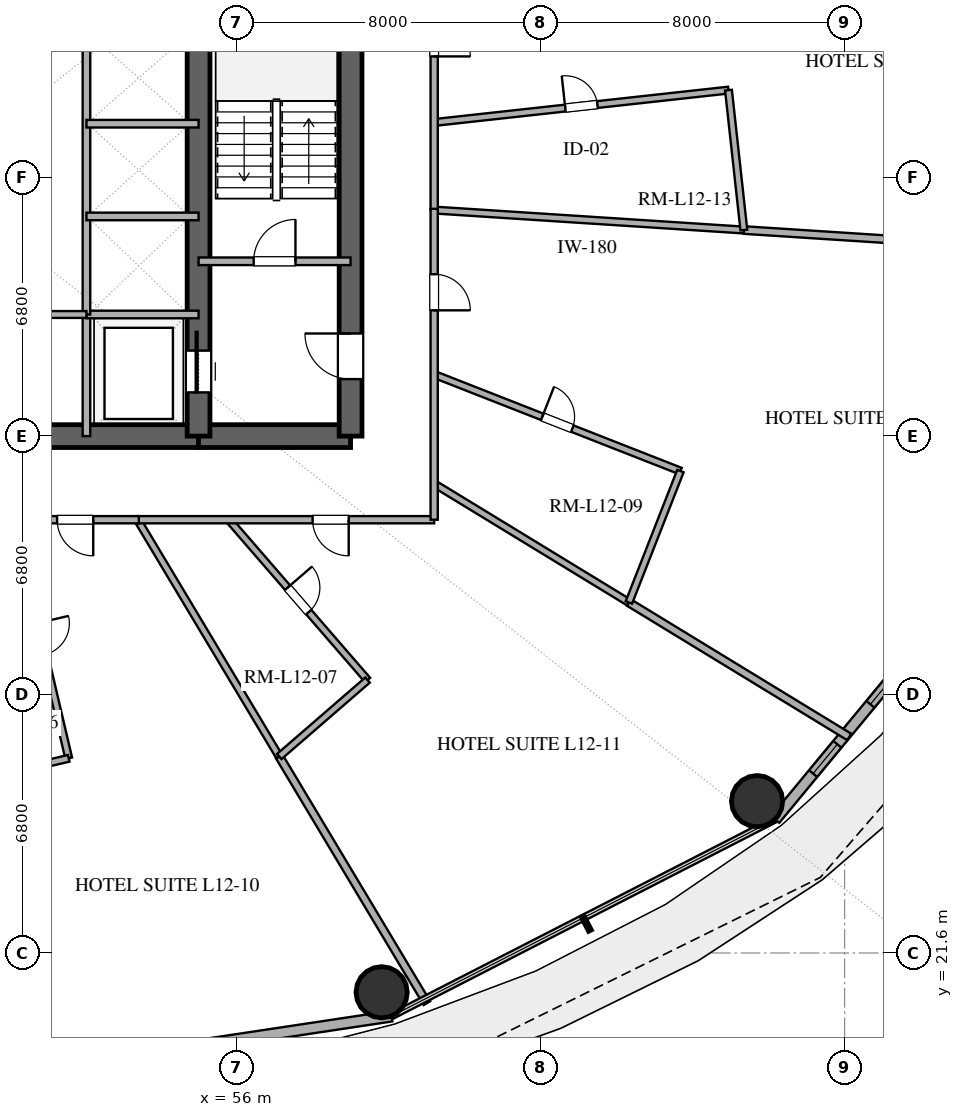
"""IFC4 building model, lengths in metres.
Left out: names, types, materials, properties, quantities, classifications, styles, units other than length and angle.
Written with IfcOpenShell. Run it as: python <this file> out.ifc"""

import sys

from ifc_helpers import new_model, si_unit, direction, frame, frame_2d, origin, origin_2d, place, context, subcontext, project, spatial, rectangle, hollow_circle, extrude, element, fill, save


model = new_model("IFC4")
c1 = context("Model", 3, precision=1e-05, world=origin(), true_north=direction((0.0, 1.0)))
c2 = subcontext(c1, "Body", "Model", "MODEL_VIEW")
j1 = project(units=[si_unit("LENGTHUNIT", "METRE"), si_unit("PLANEANGLEUNIT", "RADIAN")], contexts=[c1])
p1 = place(None, origin())
s1 = spatial("IfcSite", under=j1, at=p1, CompositionType="ELEMENT")
p2 = place(p1, origin())
s2 = spatial("IfcBuilding", under=s1, at=p2, CompositionType="ELEMENT")
p3 = place(p2, frame((0.0, 0.0, 53.4)))
s3 = spatial("IfcBuildingStorey", under=s2, at=p3, CompositionType="ELEMENT", Elevation=53.4)
p4 = place(p3, frame((41.0, 35.2, 0.0), z_axis=(0.0, 0.0, 1.0), x_axis=(1.0, 0.0, 0.0)))
e1 = element("IfcWall", 1, at=p4, inside=s3, PredefinedType="SHEAR", context=c2, shape_type="SweptSolid", body=[
    extrude(rectangle(XDim=14.0, YDim=0.6, at=frame_2d((7.0, 0.0))), origin(), (0.0, 0.0, 1.0), 3.38),
])
p5 = place(p4, frame((6.1, 0.0, 0.0)))
e2 = element("IfcOpeningElement", 2, at=p5, cuts=e1, PredefinedType="OPENING", context=c2, shape_type="SweptSolid", body=[
    extrude(rectangle(XDim=1.8, YDim=2.25, at=frame_2d((0.9, 1.125))), frame((0.0, 0.31, 0.0), z_axis=(0.0, -1.0, 0.0), x_axis=(1.0, 0.0, 0.0)), (0.0, 0.0, 1.0), 0.62),
])
p6 = place(p3, frame((55.0, 35.2, 0.0), z_axis=(0.0, 0.0, 1.0), x_axis=(1.0, 0.0, 0.0)))
e3 = element("IfcWall", 3, at=p6, inside=s3, PredefinedType="SHEAR", context=c2, shape_type="SweptSolid", body=[
    extrude(rectangle(XDim=4.0, YDim=0.6, at=frame_2d((2.0, 0.0))), origin(), (0.0, 0.0, 1.0), 3.38),
])
p7 = place(p3, frame((59.0, 35.2, 0.0), z_axis=(0.0, 0.0, 1.0), x_axis=(0.0, 1.0, 0.0)))
e4 = element("IfcWall", 4, at=p7, inside=s3, PredefinedType="SHEAR", context=c2, shape_type="SweptSolid", body=[
    extrude(rectangle(XDim=13.6, YDim=0.6, at=frame_2d((6.8, 0.0))), origin(), (0.0, 0.0, 1.0), 3.38),
])
p8 = place(p7, frame((1.5, 0.0, 0.0)))
e5 = element("IfcOpeningElement", 5, at=p8, cuts=e4, PredefinedType="OPENING", context=c2, shape_type="SweptSolid", body=[
    extrude(rectangle(XDim=1.2, YDim=2.15, at=frame_2d((0.6, 1.075))), frame((0.0, 0.31, 0.0), z_axis=(0.0, -1.0, 0.0), x_axis=(1.0, 0.0, 0.0)), (0.0, 0.0, 1.0), 0.62),
])
p9 = place(p3, frame((55.0, 35.2, 0.0), z_axis=(0.0, 0.0, 1.0), x_axis=(0.0, 1.0, 0.0)))
e6 = element("IfcWall", 6, at=p9, inside=s3, PredefinedType="SHEAR", context=c2, shape_type="SweptSolid", body=[
    extrude(rectangle(XDim=13.6, YDim=0.6, at=frame_2d((6.8, 0.0))), origin(), (0.0, 0.0, 1.0), 3.38),
])
p10 = place(p9, frame((1.15, 0.0, 0.0)))
e7 = element("IfcOpeningElement", 7, at=p10, cuts=e6, PredefinedType="OPENING", context=c2, shape_type="SweptSolid", body=[
    extrude(rectangle(XDim=1.1, YDim=2.2, at=frame_2d((0.55, 1.1))), frame((0.0, 0.31, 0.0), z_axis=(0.0, -1.0, 0.0), x_axis=(1.0, 0.0, 0.0)), (0.0, 0.0, 1.0), 0.62),
])
for number, where, z_axis, x_axis in (
    (8, (59.818, 20.566, 0.0), (0.0, 0.0, 1.0), (1.0, 0.0, 0.0)),
    (9, (69.697, 25.595, 0.0), (0.0, 0.0, 1.0), (1.0, 0.0, 0.0)),
):
    element("IfcColumn", number, at=place(p3, frame(where, z_axis=z_axis, x_axis=x_axis)), inside=s3, PredefinedType="COLUMN", context=c2, shape_type="SweptSolid", body=[
        extrude(hollow_circle(Radius=0.675, WallThickness=0.036, at=origin_2d()), origin(), (0.0, 0.0, 1.0), 3.38),
    ])
p11 = place(p3, frame((48.0, 18.12, 0.0), z_axis=(0.0, 0.0, 1.0), x_axis=(0.988864835849, 0.148816452121, 0.0)))
e10 = element("IfcWall", 10, at=p11, inside=s3, PredefinedType="SOLIDWALL", context=c2, shape_type="SweptSolid", body=[
    extrude(rectangle(XDim=12.214, YDim=0.28, at=frame_2d((6.107, 0.0))), origin(), (0.0, 0.0, 1.0), 3.38),
])
p12 = place(p11, frame((1.621, 0.0, 0.0)))
e11 = element("IfcOpeningElement", 11, at=p12, cuts=e10, PredefinedType="OPENING", context=c2, shape_type="SweptSolid", body=[
    extrude(rectangle(XDim=1.05, YDim=2.2, at=frame_2d((0.525, 1.1))), frame((0.0, 0.15, 0.0), z_axis=(0.0, -1.0, 0.0), x_axis=(1.0, 0.0, 0.0)), (0.0, 0.0, 1.0), 0.3),
])
p13 = place(p3, frame((70.174, 25.114, 0.0), z_axis=(0.0, 0.0, 1.0), x_axis=(0.637296809613, 0.770618437657, 0.0)))
e12 = element("IfcWall", 12, at=p13, inside=s3, PredefinedType="SOLIDWALL", context=c2, shape_type="SweptSolid", body=[
    extrude(rectangle(XDim=10.053, YDim=0.28, at=frame_2d((5.027, 0.0))), origin(), (0.0, 0.0, 1.0), 3.38),
])
p14 = place(p13, frame((1.565, 0.0, 0.85)))
e13 = element("IfcOpeningElement", 13, at=p14, cuts=e12, PredefinedType="OPENING", context=c2, shape_type="SweptSolid", body=[
    extrude(rectangle(XDim=1.0, YDim=1.8, at=frame_2d((0.5, 0.9))), frame((0.0, 0.15, 0.0), z_axis=(0.0, -1.0, 0.0), x_axis=(1.0, 0.0, 0.0)), (0.0, 0.0, 1.0), 0.3),
])
p15 = place(p13, frame((3.93, 0.0, 0.85)))
e14 = element("IfcOpeningElement", 14, at=p15, cuts=e12, PredefinedType="OPENING", context=c2, shape_type="SweptSolid", body=[
    extrude(rectangle(XDim=1.5, YDim=1.8, at=frame_2d((0.75, 0.9))), frame((0.0, 0.15, 0.0), z_axis=(0.0, -1.0, 0.0), x_axis=(1.0, 0.0, 0.0)), (0.0, 0.0, 1.0), 0.3),
])
p16 = place(p13, frame((6.196, 0.0, 0.85)))
e15 = element("IfcOpeningElement", 15, at=p16, cuts=e12, PredefinedType="OPENING", context=c2, shape_type="SweptSolid", body=[
    extrude(rectangle(XDim=1.5, YDim=1.8, at=frame_2d((0.75, 0.9))), frame((0.0, 0.15, 0.0), z_axis=(0.0, -1.0, 0.0), x_axis=(1.0, 0.0, 0.0)), (0.0, 0.0, 1.0), 0.3),
])
p17 = place(p3, frame((55.0, 39.8, 0.0), z_axis=(0.0, 0.0, 1.0), x_axis=(1.0, 0.0, 0.0)))
e16 = element("IfcWall", 16, at=p17, inside=s3, PredefinedType="SOLIDWALL", context=c2, shape_type="SweptSolid", body=[
    extrude(rectangle(XDim=4.0, YDim=0.2, at=frame_2d((2.0, 0.0))), origin(), (0.0, 0.0, 1.0), 2.74),
])
p18 = place(p17, frame((1.45, 0.0, 0.0)))
e17 = element("IfcOpeningElement", 17, at=p18, cuts=e16, PredefinedType="OPENING", context=c2, shape_type="SweptSolid", body=[
    extrude(rectangle(XDim=1.1, YDim=2.15, at=frame_2d((0.55, 1.075))), frame((0.0, 0.11, 0.0), z_axis=(0.0, -1.0, 0.0), x_axis=(1.0, 0.0, 0.0)), (0.0, 0.0, 1.0), 0.22),
])
p19 = place(p3, frame((52.05, 35.2, 0.0), z_axis=(0.0, 0.0, 1.0), x_axis=(0.0, 1.0, 0.0)))
e18 = element("IfcWall", 18, at=p19, inside=s3, PredefinedType="SOLIDWALL", context=c2, shape_type="SweptSolid", body=[
    extrude(rectangle(XDim=3.2, YDim=0.2, at=frame_2d((1.6, 0.0))), origin(), (0.0, 0.0, 1.0), 2.74),
])
p20 = place(p3, frame((52.05, 38.4, 0.0), z_axis=(0.0, 0.0, 1.0), x_axis=(1.0, 0.0, 0.0)))
e19 = element("IfcWall", 19, at=p20, inside=s3, PredefinedType="SOLIDWALL", context=c2, shape_type="SweptSolid", body=[
    extrude(rectangle(XDim=2.95, YDim=0.2, at=frame_2d((1.475, 0.0))), origin(), (0.0, 0.0, 1.0), 2.74),
])
p21 = place(p3, frame((52.05, 38.4, 0.0), z_axis=(0.0, 0.0, 1.0), x_axis=(0.0, 1.0, 0.0)))
e20 = element("IfcWall", 20, at=p21, inside=s3, PredefinedType="SOLIDWALL", context=c2, shape_type="SweptSolid", body=[
    extrude(rectangle(XDim=10.4, YDim=0.2, at=frame_2d((5.2, 0.0))), origin(), (0.0, 0.0, 1.0), 2.74),
])
p22 = place(p21, frame((8.2, 0.0, 0.0)))
e21 = element("IfcOpeningElement", 21, at=p22, cuts=e20, PredefinedType="OPENING", context=c2, shape_type="SweptSolid", body=[
    extrude(rectangle(XDim=1.2, YDim=2.2, at=frame_2d((0.6, 1.1))), frame((0.0, 0.11, 0.0), z_axis=(0.0, -1.0, 0.0), x_axis=(1.0, 0.0, 0.0)), (0.0, 0.0, 1.0), 0.22),
])
for number, where, z_axis, x_axis in (
    (22, (52.05, 40.98, 0.0), (0.0, 0.0, 1.0), (1.0, 0.0, 0.0)),
    (23, (52.05, 43.42, 0.0), (0.0, 0.0, 1.0), (1.0, 0.0, 0.0)),
):
    element("IfcWall", number, at=place(p3, frame(where, z_axis=z_axis, x_axis=x_axis)), inside=s3, PredefinedType="SOLIDWALL", context=c2, shape_type="SweptSolid", body=[
        extrude(rectangle(XDim=2.95, YDim=0.2, at=frame_2d((1.475, 0.0))), origin(), (0.0, 0.0, 1.0), 2.74),
    ])
p23 = place(p3, frame((49.2, 38.4, 0.0), z_axis=(0.0, 0.0, 1.0), x_axis=(1.0, 0.0, 0.0)))
e24 = element("IfcWall", 24, at=p23, inside=s3, PredefinedType="PLUMBINGWALL", context=c2, shape_type="SweptSolid", body=[
    extrude(rectangle(XDim=2.85, YDim=0.18, at=frame_2d((1.425, 0.0))), origin(), (0.0, 0.0, 1.0), 2.74),
])
p24 = place(p3, frame((78.364, 40.041, 0.0), z_axis=(0.0, 0.0, 1.0), x_axis=(-0.997924020497, 0.064402246198, 0.0)))
e25 = element("IfcWall", 25, at=p24, inside=s3, PredefinedType="PARTITIONING", context=c2, shape_type="SweptSolid", body=[
    extrude(rectangle(XDim=9.034, YDim=0.2, at=frame_2d((4.517, 0.0))), origin(), (0.0, 0.0, 1.0), 2.74),
])
p25 = place(p3, frame((69.349, 40.622, 0.0), z_axis=(0.0, 0.0, 1.0), x_axis=(-0.997924317455, 0.064397644621, 0.0)))
e26 = element("IfcWall", 26, at=p25, inside=s3, PredefinedType="PLUMBINGWALL", context=c2, shape_type="SweptSolid", body=[
    extrude(rectangle(XDim=8.166, YDim=0.18, at=frame_2d((4.083, 0.0))), origin(), (0.0, 0.0, 1.0), 2.74),
])
p26 = place(p3, frame((61.2, 43.452, 0.0), z_axis=(0.0, 0.0, 1.0), x_axis=(0.994005037085, 0.109334286708, 0.0)))
e27 = element("IfcWall", 27, at=p26, inside=s3, PredefinedType="PLUMBINGWALL", context=c2, shape_type="SweptSolid", body=[
    extrude(rectangle(XDim=7.791, YDim=0.18, at=frame_2d((3.896, 0.0))), origin(), (0.0, 0.0, 1.0), 2.74),
])
p27 = place(p26, frame((3.47, 0.0, 0.0)))
e28 = element("IfcOpeningElement", 28, at=p27, cuts=e27, PredefinedType="OPENING", context=c2, shape_type="SweptSolid", body=[
    extrude(rectangle(XDim=0.85, YDim=2.1, at=frame_2d((0.425, 1.05))), frame((0.0, 0.1, 0.0), z_axis=(0.0, -1.0, 0.0), x_axis=(1.0, 0.0, 0.0)), (0.0, 0.0, 1.0), 0.2),
])
p28 = place(p3, frame((61.01, 20.281, 0.0), z_axis=(0.0, 0.0, 1.0), x_axis=(-0.513892719639, 0.857854458928, 0.0)))
e29 = element("IfcWall", 29, at=p28, inside=s3, PredefinedType="PARTITIONING", context=c2, shape_type="SweptSolid", body=[
    extrude(rectangle(XDim=7.563, YDim=0.2, at=frame_2d((3.781, 0.0))), origin(), (0.0, 0.0, 1.0), 2.74),
])
p29 = place(p3, frame((57.124, 26.769, 0.0), z_axis=(0.0, 0.0, 1.0), x_axis=(-0.513872793929, 0.857866394994, 0.0)))
e30 = element("IfcWall", 30, at=p29, inside=s3, PredefinedType="PLUMBINGWALL", context=c2, shape_type="SweptSolid", body=[
    extrude(rectangle(XDim=7.263, YDim=0.18, at=frame_2d((3.632, 0.0))), origin(), (0.0, 0.0, 1.0), 2.74),
])
p30 = place(p3, frame((61.2, 36.823, 0.0), z_axis=(0.0, 0.0, 1.0), x_axis=(0.930954264603, -0.365135806539, 0.0)))
e31 = element("IfcWall", 31, at=p30, inside=s3, PredefinedType="PLUMBINGWALL", context=c2, shape_type="SweptSolid", body=[
    extrude(rectangle(XDim=6.961, YDim=0.18, at=frame_2d((3.48, 0.0))), origin(), (0.0, 0.0, 1.0), 2.74),
])
p31 = place(p30, frame((3.055, 0.0, 0.0)))
e32 = element("IfcOpeningElement", 32, at=p31, cuts=e31, PredefinedType="OPENING", context=c2, shape_type="SweptSolid", body=[
    extrude(rectangle(XDim=0.85, YDim=2.1, at=frame_2d((0.425, 1.05))), frame((0.0, 0.1, 0.0), z_axis=(0.0, -1.0, 0.0), x_axis=(1.0, 0.0, 0.0)), (0.0, 0.0, 1.0), 0.2),
])
p32 = place(p3, frame((72.123, 27.284, 0.0), z_axis=(0.0, 0.0, 1.0), x_axis=(-0.853686673388, 0.520786965735, 0.0)))
e33 = element("IfcWall", 33, at=p32, inside=s3, PredefinedType="PARTITIONING", context=c2, shape_type="SweptSolid", body=[
    extrude(rectangle(XDim=6.793, YDim=0.2, at=frame_2d((3.396, 0.0))), origin(), (0.0, 0.0, 1.0), 2.74),
])
p33 = place(p3, frame((50.111, 33.0, 0.0), z_axis=(0.0, 0.0, 1.0), x_axis=(0.228380862789, -0.973571867666, 0.0)))
e34 = element("IfcWall", 34, at=p33, inside=s3, PredefinedType="PLUMBINGWALL", context=c2, shape_type="SweptSolid", body=[
    extrude(rectangle(XDim=6.448, YDim=0.18, at=frame_2d((3.224, 0.0))), origin(), (0.0, 0.0, 1.0), 2.74),
])
p34 = place(p33, frame((2.799, 0.0, 0.0)))
e35 = element("IfcOpeningElement", 35, at=p34, cuts=e34, PredefinedType="OPENING", context=c2, shape_type="SweptSolid", body=[
    extrude(rectangle(XDim=0.85, YDim=2.1, at=frame_2d((0.425, 1.05))), frame((0.0, 0.1, 0.0), z_axis=(0.0, -1.0, 0.0), x_axis=(1.0, 0.0, 0.0)), (0.0, 0.0, 1.0), 0.2),
])
p35 = place(p3, frame((66.323, 30.822, 0.0), z_axis=(0.0, 0.0, 1.0), x_axis=(-0.853693843866, 0.52077521153, 0.0)))
e36 = element("IfcWall", 36, at=p35, inside=s3, PredefinedType="PLUMBINGWALL", context=c2, shape_type="SweptSolid", body=[
    extrude(rectangle(XDim=6.002, YDim=0.18, at=frame_2d((3.001, 0.0))), origin(), (0.0, 0.0, 1.0), 2.74),
])
p36 = place(p3, frame((55.794, 33.0, 0.0), z_axis=(0.0, 0.0, 1.0), x_axis=(0.654630697525, -0.755948840767, 0.0)))
e37 = element("IfcWall", 37, at=p36, inside=s3, PredefinedType="PLUMBINGWALL", context=c2, shape_type="SweptSolid", body=[
    extrude(rectangle(XDim=5.581, YDim=0.18, at=frame_2d((2.791, 0.0))), origin(), (0.0, 0.0, 1.0), 2.74),
])
p37 = place(p36, frame((2.365, 0.0, 0.0)))
e38 = element("IfcOpeningElement", 38, at=p37, cuts=e37, PredefinedType="OPENING", context=c2, shape_type="SweptSolid", body=[
    extrude(rectangle(XDim=0.85, YDim=2.1, at=frame_2d((0.425, 1.05))), frame((0.0, 0.1, 0.0), z_axis=(0.0, -1.0, 0.0), x_axis=(1.0, 0.0, 0.0)), (0.0, 0.0, 1.0), 0.2),
])
p38 = place(p3, frame((61.2, 33.0, 0.0), z_axis=(0.0, 0.0, 1.0), x_axis=(-1.0, 0.0, 0.0)))
e39 = element("IfcWall", 39, at=p38, inside=s3, PredefinedType="PARTITIONING", context=c2, shape_type="SweptSolid", body=[
    extrude(rectangle(XDim=7.846, YDim=0.19, at=frame_2d((3.923, 0.0))), origin(), (0.0, 0.0, 1.0), 2.74),
])
p39 = place(p38, frame((2.249, 0.0, 0.0)))
e40 = element("IfcOpeningElement", 40, at=p39, cuts=e39, PredefinedType="OPENING", context=c2, shape_type="SweptSolid", body=[
    extrude(rectangle(XDim=0.95, YDim=2.15, at=frame_2d((0.475, 1.075))), frame((0.0, 0.105, 0.0), z_axis=(0.0, -1.0, 0.0), x_axis=(1.0, 0.0, 0.0)), (0.0, 0.0, 1.0), 0.21),
])
p40 = place(p3, frame((61.2, 51.0, 0.0), z_axis=(0.0, 0.0, 1.0), x_axis=(0.0, -1.0, 0.0)))
e41 = element("IfcWall", 41, at=p40, inside=s3, PredefinedType="PARTITIONING", context=c2, shape_type="SweptSolid", body=[
    extrude(rectangle(XDim=9.852, YDim=0.19, at=frame_2d((4.926, 0.0))), origin(), (0.0, 0.0, 1.0), 2.74),
])
p41 = place(p40, frame((4.859, 0.0, 0.0)))
e42 = element("IfcOpeningElement", 42, at=p41, cuts=e41, PredefinedType="OPENING", context=c2, shape_type="SweptSolid", body=[
    extrude(rectangle(XDim=0.95, YDim=2.15, at=frame_2d((0.475, 1.075))), frame((0.0, 0.105, 0.0), z_axis=(0.0, -1.0, 0.0), x_axis=(1.0, 0.0, 0.0)), (0.0, 0.0, 1.0), 0.21),
])
p42 = place(p3, frame((61.2, 41.18, 0.0), z_axis=(0.0, 0.0, 1.0), x_axis=(0.0, -1.0, 0.0)))
e43 = element("IfcWall", 43, at=p42, inside=s3, PredefinedType="PARTITIONING", context=c2, shape_type="SweptSolid", body=[
    extrude(rectangle(XDim=8.18, YDim=0.19, at=frame_2d((4.09, 0.0))), origin(), (0.0, 0.0, 1.0), 2.74),
])
p43 = place(p42, frame((1.721, 0.0, 0.0)))
e44 = element("IfcOpeningElement", 44, at=p43, cuts=e43, PredefinedType="OPENING", context=c2, shape_type="SweptSolid", body=[
    extrude(rectangle(XDim=0.95, YDim=2.15, at=frame_2d((0.475, 1.075))), frame((0.0, 0.105, 0.0), z_axis=(0.0, -1.0, 0.0), x_axis=(1.0, 0.0, 0.0)), (0.0, 0.0, 1.0), 0.21),
])
p44 = place(p3, frame((67.68, 34.281, 0.0), z_axis=(0.0, 0.0, 1.0), x_axis=(-0.365174619735, -0.930939040486, 0.0)))
e45 = element("IfcWall", 45, at=p44, inside=s3, PredefinedType="PLUMBINGWALL", context=c2, shape_type="SweptSolid", body=[
    extrude(rectangle(XDim=3.716, YDim=0.18, at=frame_2d((1.858, 0.0))), origin(), (0.0, 0.0, 1.0), 2.74),
])
p45 = place(p3, frame((68.944, 44.304, 0.0), z_axis=(0.0, 0.0, 1.0), x_axis=(0.109360669908, -0.994002134745, 0.0)))
e46 = element("IfcWall", 46, at=p45, inside=s3, PredefinedType="PLUMBINGWALL", context=c2, shape_type="SweptSolid", body=[
    extrude(rectangle(XDim=3.704, YDim=0.18, at=frame_2d((1.852, 0.0))), origin(), (0.0, 0.0, 1.0), 2.74),
])
p46 = place(p3, frame((53.429, 33.0, 0.0), z_axis=(0.0, 0.0, 1.0), x_axis=(-1.0, 0.0, 0.0)))
e47 = element("IfcWall", 47, at=p46, inside=s3, PredefinedType="PARTITIONING", context=c2, shape_type="SweptSolid", body=[
    extrude(rectangle(XDim=3.351, YDim=0.19, at=frame_2d((1.675, 0.0))), origin(), (0.0, 0.0, 1.0), 2.74),
])
p47 = place(p46, frame((1.2, 0.0, 0.0)))
e48 = element("IfcOpeningElement", 48, at=p47, cuts=e47, PredefinedType="OPENING", context=c2, shape_type="SweptSolid", body=[
    extrude(rectangle(XDim=0.95, YDim=2.15, at=frame_2d((0.475, 1.075))), frame((0.0, 0.105, 0.0), z_axis=(0.0, -1.0, 0.0), x_axis=(1.0, 0.0, 0.0)), (0.0, 0.0, 1.0), 0.21),
])
p48 = place(p3, frame((59.447, 28.781, 0.0), z_axis=(0.0, 0.0, 1.0), x_axis=(-0.755927521829, -0.654655315217, 0.0)))
e49 = element("IfcWall", 49, at=p48, inside=s3, PredefinedType="PLUMBINGWALL", context=c2, shape_type="SweptSolid", body=[
    extrude(rectangle(XDim=3.074, YDim=0.18, at=frame_2d((1.537, 0.0))), origin(), (0.0, 0.0, 1.0), 2.74),
])
p49 = place(p3, frame((51.583, 26.722, 0.0), z_axis=(0.0, 0.0, 1.0), x_axis=(-0.973579428385, -0.228348629567, 0.0)))
e50 = element("IfcWall", 50, at=p49, inside=s3, PredefinedType="PLUMBINGWALL", context=c2, shape_type="SweptSolid", body=[
    extrude(rectangle(XDim=2.759, YDim=0.18, at=frame_2d((1.379, 0.0))), origin(), (0.0, 0.0, 1.0), 2.74),
])
p50 = place(p14, origin())
e51 = element("IfcWindow", 51, at=p50, inside=s3, PartitioningType="SINGLE_PANEL", PredefinedType="WINDOW", context=c2, shape_type="SweptSolid", body=[
    extrude(rectangle(XDim=1.0, YDim=1.8, at=frame_2d((0.5, 0.9))), frame((0.0, 0.03, 0.0), z_axis=(0.0, -1.0, 0.0), x_axis=(1.0, 0.0, 0.0)), (0.0, 0.0, 1.0), 0.06),
])
fill(e13, e51)
p51 = place(p15, origin())
e52 = element("IfcWindow", 52, at=p51, inside=s3, PartitioningType="SINGLE_PANEL", PredefinedType="WINDOW", context=c2, shape_type="SweptSolid", body=[
    extrude(rectangle(XDim=1.5, YDim=1.8, at=frame_2d((0.75, 0.9))), frame((0.0, 0.03, 0.0), z_axis=(0.0, -1.0, 0.0), x_axis=(1.0, 0.0, 0.0)), (0.0, 0.0, 1.0), 0.06),
])
fill(e14, e52)
p52 = place(p10, origin())
e53 = element("IfcDoor", 53, at=p52, inside=s3, OperationType="SLIDING_TO_RIGHT", PredefinedType="DOOR", context=c2, shape_type="SweptSolid", body=[
    extrude(rectangle(XDim=1.1, YDim=2.2, at=frame_2d((0.55, 1.1))), frame((0.0, 0.025, 0.0), z_axis=(0.0, -1.0, 0.0), x_axis=(1.0, 0.0, 0.0)), (0.0, 0.0, 1.0), 0.05),
])
fill(e7, e53)
p53 = place(p8, origin())
e54 = element("IfcDoor", 54, at=p53, inside=s3, OperationType="SINGLE_SWING_RIGHT", PredefinedType="DOOR", context=c2, shape_type="SweptSolid", body=[
    extrude(rectangle(XDim=1.2, YDim=2.15, at=frame_2d((0.6, 1.075))), frame((0.0, 0.025, 0.0), z_axis=(0.0, -1.0, 0.0), x_axis=(1.0, 0.0, 0.0)), (0.0, 0.0, 1.0), 0.05),
])
fill(e5, e54)
p54 = place(p18, origin())
e55 = element("IfcDoor", 55, at=p54, inside=s3, OperationType="SINGLE_SWING_RIGHT", PredefinedType="DOOR", context=c2, shape_type="SweptSolid", body=[
    extrude(rectangle(XDim=1.1, YDim=2.15, at=frame_2d((0.55, 1.075))), frame((0.0, 0.025, 0.0), z_axis=(0.0, -1.0, 0.0), x_axis=(1.0, 0.0, 0.0)), (0.0, 0.0, 1.0), 0.05),
])
fill(e17, e55)
p55 = place(p27, origin())
e56 = element("IfcDoor", 56, at=p55, inside=s3, OperationType="SINGLE_SWING_LEFT", PredefinedType="DOOR", context=c2, shape_type="SweptSolid", body=[
    extrude(rectangle(XDim=0.85, YDim=2.1, at=frame_2d((0.425, 1.05))), frame((0.0, 0.025, 0.0), z_axis=(0.0, -1.0, 0.0), x_axis=(1.0, 0.0, 0.0)), (0.0, 0.0, 1.0), 0.05),
])
fill(e28, e56)
p56 = place(p31, origin())
e57 = element("IfcDoor", 57, at=p56, inside=s3, OperationType="SINGLE_SWING_LEFT", PredefinedType="DOOR", context=c2, shape_type="SweptSolid", body=[
    extrude(rectangle(XDim=0.85, YDim=2.1, at=frame_2d((0.425, 1.05))), frame((0.0, 0.025, 0.0), z_axis=(0.0, -1.0, 0.0), x_axis=(1.0, 0.0, 0.0)), (0.0, 0.0, 1.0), 0.05),
])
fill(e32, e57)
p57 = place(p37, origin())
e58 = element("IfcDoor", 58, at=p57, inside=s3, OperationType="SINGLE_SWING_LEFT", PredefinedType="DOOR", context=c2, shape_type="SweptSolid", body=[
    extrude(rectangle(XDim=0.85, YDim=2.1, at=frame_2d((0.425, 1.05))), frame((0.0, 0.025, 0.0), z_axis=(0.0, -1.0, 0.0), x_axis=(1.0, 0.0, 0.0)), (0.0, 0.0, 1.0), 0.05),
])
fill(e38, e58)
p58 = place(p39, origin())
e59 = element("IfcDoor", 59, at=p58, inside=s3, OperationType="SINGLE_SWING_LEFT", PredefinedType="DOOR", context=c2, shape_type="SweptSolid", body=[
    extrude(rectangle(XDim=0.95, YDim=2.15, at=frame_2d((0.475, 1.075))), frame((0.0, 0.025, 0.0), z_axis=(0.0, -1.0, 0.0), x_axis=(1.0, 0.0, 0.0)), (0.0, 0.0, 1.0), 0.05),
])
fill(e40, e59)
p59 = place(p41, origin())
e60 = element("IfcDoor", 60, at=p59, inside=s3, OperationType="SINGLE_SWING_RIGHT", PredefinedType="DOOR", context=c2, shape_type="SweptSolid", body=[
    extrude(rectangle(XDim=0.95, YDim=2.15, at=frame_2d((0.475, 1.075))), frame((0.0, 0.025, 0.0), z_axis=(0.0, -1.0, 0.0), x_axis=(1.0, 0.0, 0.0)), (0.0, 0.0, 1.0), 0.05),
])
fill(e42, e60)
p60 = place(p43, origin())
e61 = element("IfcDoor", 61, at=p60, inside=s3, OperationType="SINGLE_SWING_RIGHT", PredefinedType="DOOR", context=c2, shape_type="SweptSolid", body=[
    extrude(rectangle(XDim=0.95, YDim=2.15, at=frame_2d((0.475, 1.075))), frame((0.0, 0.025, 0.0), z_axis=(0.0, -1.0, 0.0), x_axis=(1.0, 0.0, 0.0)), (0.0, 0.0, 1.0), 0.05),
])
fill(e44, e61)
p61 = place(p47, origin())
e62 = element("IfcDoor", 62, at=p61, inside=s3, OperationType="SINGLE_SWING_LEFT", PredefinedType="DOOR", context=c2, shape_type="SweptSolid", body=[
    extrude(rectangle(XDim=0.95, YDim=2.15, at=frame_2d((0.475, 1.075))), frame((0.0, 0.025, 0.0), z_axis=(0.0, -1.0, 0.0), x_axis=(1.0, 0.0, 0.0)), (0.0, 0.0, 1.0), 0.05),
])
fill(e48, e62)
save(model, sys.argv[1])
